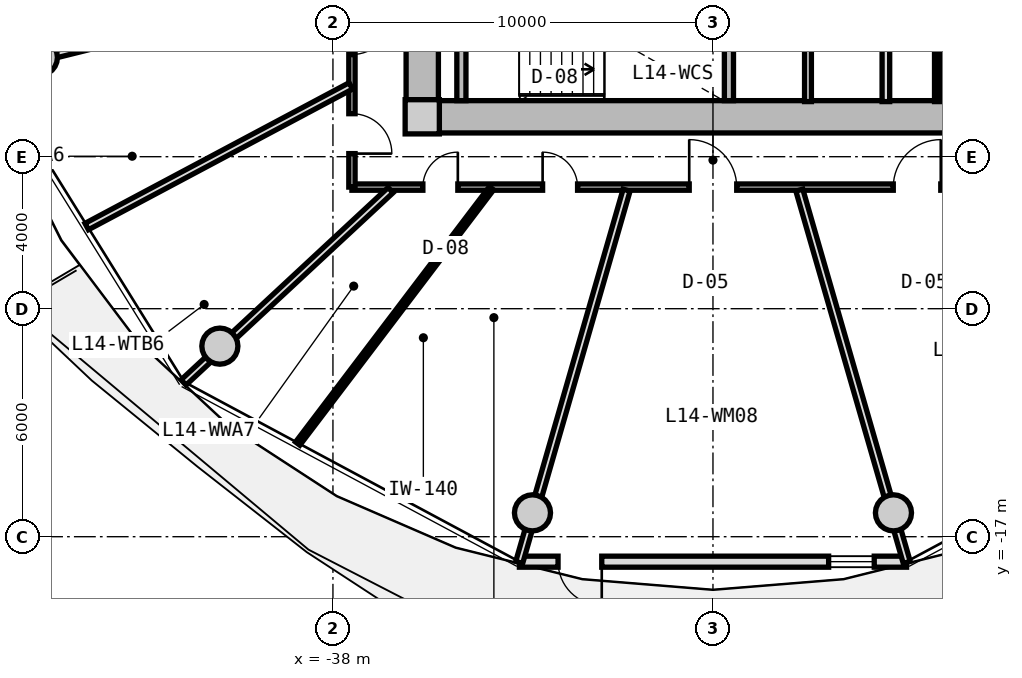
"""IFC4 building model, lengths in metres.
Left out: names, types, materials, properties, quantities, classifications, styles, units other than length and angle.
Written with IfcOpenShell. Run it as: python <this file> out.ifc"""

import sys

from ifc_helpers import new_model, si_unit, direction, frame, frame_2d, origin, origin_2d, place, context, subcontext, project, spatial, rectangle, circle, extrude, source, transform, mapped, element, fill, save


model = new_model("IFC4")
c1 = context("Model", 3, precision=1e-05, world=origin(), true_north=direction((0.0, 1.0)))
c2 = subcontext(c1, "Body", "Model", "MODEL_VIEW")
j1 = project(units=[si_unit("LENGTHUNIT", "METRE"), si_unit("PLANEANGLEUNIT", "RADIAN")], contexts=[c1])
p1 = place(None, origin())
s1 = spatial("IfcSite", under=j1, at=p1, CompositionType="ELEMENT")
p2 = place(p1, origin())
s2 = spatial("IfcBuilding", under=s1, at=p2, CompositionType="ELEMENT")
p3 = place(p2, frame((0.0, 0.0, 49.05)))
s3 = spatial("IfcBuildingStorey", under=s2, at=p3, CompositionType="ELEMENT", Elevation=49.05)
m1 = source(origin(), c2, "Body", "SweptSolid", [
    extrude(rectangle(XDim=0.9, YDim=0.9, at=origin_2d()), origin(), (0.0, 0.0, 1.0), 3.05),
])
p4 = place(p3, frame((-35.65, -5.95, 0.0), z_axis=(0.0, 0.0, 1.0), x_axis=(1.0, 0.0, 0.0)))
e1 = element("IfcColumn", 1, at=p4, inside=s3, PredefinedType="COLUMN", context=c2, shape_type="MappedRepresentation", body=[
    mapped(m1, transform((0.0, 0.0, 0.0), x_axis=(1.0, 0.0, 0.0), y_axis=(0.0, 1.0, 0.0), z_axis=(0.0, 0.0, 1.0), scale=1.0)),
])
m2 = source(origin(), c2, "Body", "SweptSolid", [
    extrude(rectangle(XDim=14.4, YDim=0.85, at=frame_2d((7.2, 0.0))), origin(), (0.0, 0.0, 1.0), 2.79),
])
p5 = place(p3, frame((-20.8, -5.95, 0.0), z_axis=(0.0, 0.0, 1.0), x_axis=(-1.0, 0.0, 0.0)))
e2 = element("IfcWall", 2, at=p5, inside=s3, PredefinedType="SHEAR", context=c2, shape_type="MappedRepresentation", body=[
    mapped(m2, transform((0.0, 0.0, 0.0), x_axis=(1.0, 0.0, 0.0), y_axis=(0.0, 1.0, 0.0), z_axis=(0.0, 0.0, 1.0), scale=1.0)),
])
m3 = source(origin(), c2, "Body", "SweptSolid", [
    extrude(rectangle(XDim=11.0, YDim=0.85, at=frame_2d((5.5, 0.0))), origin(), (0.0, 0.0, 1.0), 2.79),
])
p6 = place(p3, frame((-35.65, -5.5, 0.0), z_axis=(0.0, 0.0, 1.0), x_axis=(0.0, 1.0, 0.0)))
e3 = element("IfcWall", 3, at=p6, inside=s3, PredefinedType="SHEAR", context=c2, shape_type="MappedRepresentation", body=[
    mapped(m3, transform((0.0, 0.0, 0.0), x_axis=(1.0, 0.0, 0.0), y_axis=(0.0, 1.0, 0.0), z_axis=(0.0, 0.0, 1.0), scale=1.0)),
])
p7 = place(p6, frame((3.8, 0.0, 0.0)))
e4 = element("IfcOpeningElement", 4, at=p7, cuts=e3, PredefinedType="OPENING", context=c2, shape_type="SweptSolid", body=[
    extrude(rectangle(XDim=1.2, YDim=2.15, at=frame_2d((0.6, 1.075))), frame((0.0, 0.435, 0.0), z_axis=(0.0, -1.0, 0.0), x_axis=(1.0, 0.0, 0.0)), (0.0, 0.0, 1.0), 0.87),
])
m4 = source(origin(), c2, "Body", "SweptSolid", [
    extrude(circle(Radius=0.475, at=origin_2d()), origin(), (0.0, 0.0, 1.0), 3.05),
])
for number, where, z_axis, x_axis in (
    (5, (-45.725, -4.387, 0.0), (0.0, 0.0, 1.0), (1.0, 0.0, 0.0)),
    (6, (-40.975, -11.985, 0.0), (0.0, 0.0, 1.0), (1.0, 0.0, 0.0)),
    (7, (-32.749, -16.373, 0.0), (0.0, 0.0, 1.0), (1.0, 0.0, 0.0)),
    (8, (-23.251, -16.373, 0.0), (0.0, 0.0, 1.0), (1.0, 0.0, 0.0)),
):
    element("IfcColumn", number, at=place(p3, frame(where, z_axis=z_axis, x_axis=x_axis)), inside=s3, PredefinedType="COLUMN", context=c2, shape_type="MappedRepresentation", body=[
        mapped(m4, transform((0.0, 0.0, 0.0), x_axis=(1.0, 0.0, 0.0), y_axis=(0.0, 1.0, 0.0), z_axis=(0.0, 0.0, 1.0), scale=1.0)),
    ])
m5 = source(origin(), c2, "Body", "SweptSolid", [
    extrude(rectangle(XDim=10.187, YDim=0.29, at=frame_2d((5.094, 0.0))), origin(), (0.0, 0.0, 1.0), 2.79),
])
p8 = place(p3, frame((-22.906, -17.657, 0.0), z_axis=(0.0, 0.0, 1.0), x_axis=(-1.0, 0.0, 0.0)))
e9 = element("IfcWall", 9, at=p8, inside=s3, PredefinedType="SOLIDWALL", context=c2, shape_type="MappedRepresentation", body=[
    mapped(m5, transform((0.0, 0.0, 0.0), x_axis=(1.0, 0.0, 0.0), y_axis=(0.0, 1.0, 0.0), z_axis=(0.0, 0.0, 1.0), scale=1.0)),
])
p9 = place(p8, frame((8.02, 0.0, 0.0)))
e10 = element("IfcOpeningElement", 10, at=p9, cuts=e9, PredefinedType="OPENING", context=c2, shape_type="SweptSolid", body=[
    extrude(rectangle(XDim=1.15, YDim=2.25, at=frame_2d((0.575, 1.125))), frame((0.0, 0.155, 0.0), z_axis=(0.0, -1.0, 0.0), x_axis=(1.0, 0.0, 0.0)), (0.0, 0.0, 1.0), 0.31),
])
p10 = place(p8, frame((0.85, 0.0, 0.85)))
e11 = element("IfcOpeningElement", 11, at=p10, cuts=e9, PredefinedType="OPENING", context=c2, shape_type="SweptSolid", body=[
    extrude(rectangle(XDim=1.2, YDim=1.5, at=frame_2d((0.6, 0.75))), frame((0.0, 0.155, 0.0), z_axis=(0.0, -1.0, 0.0), x_axis=(1.0, 0.0, 0.0)), (0.0, 0.0, 1.0), 0.31),
])
m6 = source(origin(), c2, "Body", "SweptSolid", [
    extrude(rectangle(XDim=3.075, YDim=0.24, at=frame_2d((1.538, 0.0))), origin(), (0.0, 0.0, 1.0), 2.79),
])
for number, where, z_axis, x_axis in (
    (12, (-34.62, -5.525, 0.0), (0.0, 0.0, 1.0), (0.0, 1.0, 0.0)),
    (13, (-27.58, -5.525, 0.0), (0.0, 0.0, 1.0), (0.0, 1.0, 0.0)),
):
    element("IfcWall", number, at=place(p3, frame(where, z_axis=z_axis, x_axis=x_axis)), inside=s3, PredefinedType="PARTITIONING", context=c2, shape_type="MappedRepresentation", body=[
        mapped(m6, transform((0.0, 0.0, 0.0), x_axis=(1.0, 0.0, 0.0), y_axis=(0.0, 1.0, 0.0), z_axis=(0.0, 0.0, 1.0), scale=1.0)),
    ])
m7 = source(origin(), c2, "Body", "SweptSolid", [
    extrude(rectangle(XDim=3.8, YDim=0.2, at=frame_2d((1.9, 0.0))), origin(), (0.0, 0.0, 1.0), 2.775),
])
p11 = place(p3, frame((-23.45, -5.55, 0.0), z_axis=(0.0, 0.0, 1.0), x_axis=(0.0, 1.0, 0.0)))
e14 = element("IfcWall", 14, at=p11, inside=s3, PredefinedType="PARTITIONING", context=c2, shape_type="MappedRepresentation", body=[
    mapped(m7, transform((0.0, 0.0, 0.0), x_axis=(1.0, 0.0, 0.0), y_axis=(0.0, 1.0, 0.0), z_axis=(0.0, 0.0, 1.0), scale=1.0)),
])
m8 = source(origin(), c2, "Body", "SweptSolid", [
    extrude(rectangle(XDim=3.22, YDim=0.18, at=frame_2d((1.61, 0.0))), origin(), (0.0, 0.0, 1.0), 2.775),
])
p12 = place(p3, frame((-25.5, -5.55, 0.0), z_axis=(0.0, 0.0, 1.0), x_axis=(0.0, 1.0, 0.0)))
e15 = element("IfcWall", 15, at=p12, inside=s3, PredefinedType="PARTITIONING", context=c2, shape_type="MappedRepresentation", body=[
    mapped(m8, transform((0.0, 0.0, 0.0), x_axis=(1.0, 0.0, 0.0), y_axis=(0.0, 1.0, 0.0), z_axis=(0.0, 0.0, 1.0), scale=1.0)),
])
m9 = source(origin(), c2, "Body", "SweptSolid", [
    extrude(rectangle(XDim=3.8, YDim=0.14, at=frame_2d((1.9, 0.0))), origin(), (0.0, 0.0, 1.0), 2.775),
])
p13 = place(p3, frame((-22.1, -5.55, 0.0), z_axis=(0.0, 0.0, 1.0), x_axis=(0.0, 1.0, 0.0)))
e16 = element("IfcWall", 16, at=p13, inside=s3, PredefinedType="PARTITIONING", context=c2, shape_type="MappedRepresentation", body=[
    mapped(m9, transform((0.0, 0.0, 0.0), x_axis=(1.0, 0.0, 0.0), y_axis=(0.0, 1.0, 0.0), z_axis=(0.0, 0.0, 1.0), scale=1.0)),
])
m10 = source(origin(), c2, "Body", "SweptSolid", [
    extrude(rectangle(XDim=19.0, YDim=0.165, at=frame_2d((9.5, 0.0))), origin(), (0.0, 0.0, 1.0), 2.775),
])
p14 = place(p3, frame((-18.5, -7.8, 0.0), z_axis=(0.0, 0.0, 1.0), x_axis=(-1.0, 0.0, 0.0)))
e17 = element("IfcWall", 17, at=p14, inside=s3, PredefinedType="PARTITIONING", context=c2, shape_type="MappedRepresentation", body=[
    mapped(m10, transform((0.0, 0.0, 0.0), x_axis=(1.0, 0.0, 0.0), y_axis=(0.0, 1.0, 0.0), z_axis=(0.0, 0.0, 1.0), scale=1.0)),
])
p15 = place(p14, frame((16.214, 0.0, 0.0)))
e18 = element("IfcOpeningElement", 18, at=p15, cuts=e17, PredefinedType="OPENING", context=c2, shape_type="SweptSolid", body=[
    extrude(rectangle(XDim=0.92, YDim=2.1, at=frame_2d((0.46, 1.05))), frame((0.0, 0.093, 0.0), z_axis=(0.0, -1.0, 0.0), x_axis=(1.0, 0.0, 0.0)), (0.0, 0.0, 1.0), 0.185),
])
p16 = place(p14, frame((13.063, 0.0, 0.0)))
e19 = element("IfcOpeningElement", 19, at=p16, cuts=e17, PredefinedType="OPENING", context=c2, shape_type="SweptSolid", body=[
    extrude(rectangle(XDim=0.92, YDim=2.1, at=frame_2d((0.46, 1.05))), frame((0.0, 0.093, 0.0), z_axis=(0.0, -1.0, 0.0), x_axis=(1.0, 0.0, 0.0)), (0.0, 0.0, 1.0), 0.185),
])
p17 = place(p14, frame((8.875, 0.0, 0.0)))
e20 = element("IfcOpeningElement", 20, at=p17, cuts=e17, PredefinedType="OPENING", context=c2, shape_type="SweptSolid", body=[
    extrude(rectangle(XDim=1.25, YDim=2.2, at=frame_2d((0.625, 1.1))), frame((0.0, 0.093, 0.0), z_axis=(0.0, -1.0, 0.0), x_axis=(1.0, 0.0, 0.0)), (0.0, 0.0, 1.0), 0.185),
])
p18 = place(p14, frame((3.506, 0.0, 0.0)))
e21 = element("IfcOpeningElement", 21, at=p18, cuts=e17, PredefinedType="OPENING", context=c2, shape_type="SweptSolid", body=[
    extrude(rectangle(XDim=1.25, YDim=2.2, at=frame_2d((0.625, 1.1))), frame((0.0, 0.093, 0.0), z_axis=(0.0, -1.0, 0.0), x_axis=(1.0, 0.0, 0.0)), (0.0, 0.0, 1.0), 0.185),
])
m11 = source(origin(), c2, "Body", "SweptSolid", [
    extrude(rectangle(XDim=15.6, YDim=0.165, at=frame_2d((7.8, 0.0))), origin(), (0.0, 0.0, 1.0), 2.775),
])
p19 = place(p3, frame((-37.5, -7.8, 0.0), z_axis=(0.0, 0.0, 1.0), x_axis=(0.0, 1.0, 0.0)))
e22 = element("IfcWall", 22, at=p19, inside=s3, PredefinedType="PARTITIONING", context=c2, shape_type="MappedRepresentation", body=[
    mapped(m11, transform((0.0, 0.0, 0.0), x_axis=(1.0, 0.0, 0.0), y_axis=(0.0, 1.0, 0.0), z_axis=(0.0, 0.0, 1.0), scale=1.0)),
])
p20 = place(p19, frame((13.623, 0.0, 0.0)))
e23 = element("IfcOpeningElement", 23, at=p20, cuts=e22, PredefinedType="OPENING", context=c2, shape_type="SweptSolid", body=[
    extrude(rectangle(XDim=1.05, YDim=2.15, at=frame_2d((0.525, 1.075))), frame((0.0, 0.093, 0.0), z_axis=(0.0, -1.0, 0.0), x_axis=(1.0, 0.0, 0.0)), (0.0, 0.0, 1.0), 0.185),
])
p21 = place(p19, frame((11.018, 0.0, 0.0)))
e24 = element("IfcOpeningElement", 24, at=p21, cuts=e22, PredefinedType="OPENING", context=c2, shape_type="SweptSolid", body=[
    extrude(rectangle(XDim=1.05, YDim=2.15, at=frame_2d((0.525, 1.075))), frame((0.0, 0.093, 0.0), z_axis=(0.0, -1.0, 0.0), x_axis=(1.0, 0.0, 0.0)), (0.0, 0.0, 1.0), 0.185),
])
p22 = place(p19, frame((8.467, 0.0, 0.0)))
e25 = element("IfcOpeningElement", 25, at=p22, cuts=e22, PredefinedType="OPENING", context=c2, shape_type="SweptSolid", body=[
    extrude(rectangle(XDim=1.05, YDim=2.15, at=frame_2d((0.525, 1.075))), frame((0.0, 0.093, 0.0), z_axis=(0.0, -1.0, 0.0), x_axis=(1.0, 0.0, 0.0)), (0.0, 0.0, 1.0), 0.185),
])
p23 = place(p19, frame((6.035, 0.0, 0.0)))
e26 = element("IfcOpeningElement", 26, at=p23, cuts=e22, PredefinedType="OPENING", context=c2, shape_type="SweptSolid", body=[
    extrude(rectangle(XDim=1.05, YDim=2.15, at=frame_2d((0.525, 1.075))), frame((0.0, 0.093, 0.0), z_axis=(0.0, -1.0, 0.0), x_axis=(1.0, 0.0, 0.0)), (0.0, 0.0, 1.0), 0.185),
])
p24 = place(p19, frame((3.489, 0.0, 0.0)))
e27 = element("IfcOpeningElement", 27, at=p24, cuts=e22, PredefinedType="OPENING", context=c2, shape_type="SweptSolid", body=[
    extrude(rectangle(XDim=1.05, YDim=2.15, at=frame_2d((0.525, 1.075))), frame((0.0, 0.093, 0.0), z_axis=(0.0, -1.0, 0.0), x_axis=(1.0, 0.0, 0.0)), (0.0, 0.0, 1.0), 0.185),
])
p25 = place(p19, frame((0.882, 0.0, 0.0)))
e28 = element("IfcOpeningElement", 28, at=p25, cuts=e22, PredefinedType="OPENING", context=c2, shape_type="SweptSolid", body=[
    extrude(rectangle(XDim=1.05, YDim=2.15, at=frame_2d((0.525, 1.075))), frame((0.0, 0.093, 0.0), z_axis=(0.0, -1.0, 0.0), x_axis=(1.0, 0.0, 0.0)), (0.0, 0.0, 1.0), 0.185),
])
m12 = source(origin(), c2, "Body", "SweptSolid", [
    extrude(rectangle(XDim=9.737, YDim=0.19, at=frame_2d((4.869, 0.0))), origin(), (0.0, 0.0, 1.0), 2.225),
])
p26 = place(p3, frame((-37.58, -2.385, 0.0), z_axis=(0.0, 0.0, 1.0), x_axis=(-0.970392716238, -0.241532557375, 0.0)))
e29 = element("IfcWall", 29, at=p26, inside=s3, PredefinedType="PARTITIONING", context=c2, shape_type="MappedRepresentation", body=[
    mapped(m12, transform((0.0, 0.0, 0.0), x_axis=(1.0, 0.0, 0.0), y_axis=(0.0, 1.0, 0.0), z_axis=(0.0, 0.0, 1.0), scale=1.0)),
])
m13 = source(origin(), c2, "Body", "SweptSolid", [
    extrude(rectangle(XDim=7.435, YDim=0.19, at=frame_2d((3.717, 0.0))), origin(), (0.0, 0.0, 1.0), 2.225),
])
p27 = place(p3, frame((-36.483, -7.88, 0.0), z_axis=(0.0, 0.0, 1.0), x_axis=(-0.732651956848, -0.680603489652, 0.0)))
e30 = element("IfcWall", 30, at=p27, inside=s3, PredefinedType="PARTITIONING", context=c2, shape_type="MappedRepresentation", body=[
    mapped(m13, transform((0.0, 0.0, 0.0), x_axis=(1.0, 0.0, 0.0), y_axis=(0.0, 1.0, 0.0), z_axis=(0.0, 0.0, 1.0), scale=1.0)),
])
m14 = source(origin(), c2, "Body", "SweptSolid", [
    extrude(rectangle(XDim=7.873, YDim=0.19, at=frame_2d((3.937, 0.0))), origin(), (0.0, 0.0, 1.0), 2.775),
])
p28 = place(p3, frame((-37.53, -5.138, 0.0), z_axis=(0.0, 0.0, 1.0), x_axis=(-0.882666052726, -0.470000680175, 0.0)))
e31 = element("IfcWall", 31, at=p28, inside=s3, PredefinedType="PARTITIONING", context=c2, shape_type="MappedRepresentation", body=[
    mapped(m14, transform((0.0, 0.0, 0.0), x_axis=(1.0, 0.0, 0.0), y_axis=(0.0, 1.0, 0.0), z_axis=(0.0, 0.0, 1.0), scale=1.0)),
])
m15 = source(origin(), c2, "Body", "SweptSolid", [
    extrude(rectangle(XDim=10.196, YDim=0.19, at=frame_2d((5.098, 0.0))), origin(), (0.0, 0.0, 1.0), 2.225),
])
p29 = place(p3, frame((-30.273, -7.88, 0.0), z_axis=(0.0, 0.0, 1.0), x_axis=(-0.277136420347, -0.960830580549, 0.0)))
e32 = element("IfcWall", 32, at=p29, inside=s3, PredefinedType="PARTITIONING", context=c2, shape_type="MappedRepresentation", body=[
    mapped(m15, transform((0.0, 0.0, 0.0), x_axis=(1.0, 0.0, 0.0), y_axis=(0.0, 1.0, 0.0), z_axis=(0.0, 0.0, 1.0), scale=1.0)),
])
m16 = source(origin(), c2, "Body", "SweptSolid", [
    extrude(rectangle(XDim=8.436, YDim=0.14, at=frame_2d((4.218, 0.0))), origin(), (0.0, 0.0, 1.0), 2.775),
])
p30 = place(p3, frame((-33.828, -7.83, 0.0), z_axis=(0.0, 0.0, 1.0), x_axis=(-0.604486552388, -0.796615345058, 0.0)))
e33 = element("IfcWall", 33, at=p30, inside=s3, PredefinedType="PARTITIONING", context=c2, shape_type="MappedRepresentation", body=[
    mapped(m16, transform((0.0, 0.0, 0.0), x_axis=(1.0, 0.0, 0.0), y_axis=(0.0, 1.0, 0.0), z_axis=(0.0, 0.0, 1.0), scale=1.0)),
])
p31 = place(p3, frame((-25.727, -7.88, 0.0), z_axis=(0.0, 0.0, 1.0), x_axis=(0.277136420347, -0.960830580549, 0.0)))
e34 = element("IfcWall", 34, at=p31, inside=s3, PredefinedType="PARTITIONING", context=c2, shape_type="MappedRepresentation", body=[
    mapped(m15, transform((0.0, 0.0, 0.0), x_axis=(1.0, 0.0, 0.0), y_axis=(0.0, 1.0, 0.0), z_axis=(0.0, 0.0, 1.0), scale=1.0)),
])
m17 = source(origin(), c2, "Body", "SweptSolid", [
    extrude(rectangle(XDim=1.15, YDim=2.25, at=frame_2d((0.575, 1.125))), frame((0.0, 0.025, 0.0), z_axis=(0.0, -1.0, 0.0), x_axis=(1.0, 0.0, 0.0)), (0.0, 0.0, 1.0), 0.05),
])
p32 = place(p9, origin())
e35 = element("IfcDoor", 35, at=p32, inside=s3, OperationType="SINGLE_SWING_LEFT", PredefinedType="DOOR", context=c2, shape_type="MappedRepresentation", body=[
    mapped(m17, transform((0.0, 0.0, 0.0), x_axis=(1.0, 0.0, 0.0), y_axis=(0.0, 1.0, 0.0), z_axis=(0.0, 0.0, 1.0), scale=1.0)),
])
fill(e10, e35)
m18 = source(origin(), c2, "Body", "SweptSolid", [
    extrude(rectangle(XDim=1.2, YDim=1.5, at=frame_2d((0.6, 0.75))), frame((0.0, 0.03, 0.0), z_axis=(0.0, -1.0, 0.0), x_axis=(1.0, 0.0, 0.0)), (0.0, 0.0, 1.0), 0.06),
])
p33 = place(p10, origin())
e36 = element("IfcWindow", 36, at=p33, inside=s3, PartitioningType="SINGLE_PANEL", PredefinedType="WINDOW", context=c2, shape_type="MappedRepresentation", body=[
    mapped(m18, transform((0.0, 0.0, 0.0), x_axis=(1.0, 0.0, 0.0), y_axis=(0.0, 1.0, 0.0), z_axis=(0.0, 0.0, 1.0), scale=1.0)),
])
fill(e11, e36)
m19 = source(origin(), c2, "Body", "SweptSolid", [
    extrude(rectangle(XDim=1.05, YDim=2.15, at=frame_2d((0.525, 1.075))), frame((0.0, 0.025, 0.0), z_axis=(0.0, -1.0, 0.0), x_axis=(1.0, 0.0, 0.0)), (0.0, 0.0, 1.0), 0.05),
])
p34 = place(p24, frame((1.05, 0.0, 0.0), z_axis=(0.0, 0.0, 1.0), x_axis=(-1.0, 0.0, 0.0)))
e37 = element("IfcDoor", 37, at=p34, inside=s3, OperationType="SINGLE_SWING_LEFT", PredefinedType="DOOR", context=c2, shape_type="MappedRepresentation", body=[
    mapped(m19, transform((0.0, 0.0, 0.0), x_axis=(1.0, 0.0, 0.0), y_axis=(0.0, 1.0, 0.0), z_axis=(0.0, 0.0, 1.0), scale=1.0)),
])
fill(e27, e37)
p35 = place(p25, frame((1.05, 0.0, 0.0), z_axis=(0.0, 0.0, 1.0), x_axis=(-1.0, 0.0, 0.0)))
e38 = element("IfcDoor", 38, at=p35, inside=s3, OperationType="SINGLE_SWING_RIGHT", PredefinedType="DOOR", context=c2, shape_type="MappedRepresentation", body=[
    mapped(m19, transform((0.0, 0.0, 0.0), x_axis=(1.0, 0.0, 0.0), y_axis=(0.0, 1.0, 0.0), z_axis=(0.0, 0.0, 1.0), scale=1.0)),
])
fill(e28, e38)
m20 = source(origin(), c2, "Body", "SweptSolid", [
    extrude(rectangle(XDim=0.92, YDim=2.1, at=frame_2d((0.46, 1.05))), frame((0.0, 0.025, 0.0), z_axis=(0.0, -1.0, 0.0), x_axis=(1.0, 0.0, 0.0)), (0.0, 0.0, 1.0), 0.05),
])
p36 = place(p15, frame((0.92, 0.0, 0.0), z_axis=(0.0, 0.0, 1.0), x_axis=(-1.0, 0.0, 0.0)))
e39 = element("IfcDoor", 39, at=p36, inside=s3, OperationType="SINGLE_SWING_RIGHT", PredefinedType="DOOR", context=c2, shape_type="MappedRepresentation", body=[
    mapped(m20, transform((0.0, 0.0, 0.0), x_axis=(1.0, 0.0, 0.0), y_axis=(0.0, 1.0, 0.0), z_axis=(0.0, 0.0, 1.0), scale=1.0)),
])
fill(e18, e39)
p37 = place(p16, frame((0.92, 0.0, 0.0), z_axis=(0.0, 0.0, 1.0), x_axis=(-1.0, 0.0, 0.0)))
e40 = element("IfcDoor", 40, at=p37, inside=s3, OperationType="SINGLE_SWING_LEFT", PredefinedType="DOOR", context=c2, shape_type="MappedRepresentation", body=[
    mapped(m20, transform((0.0, 0.0, 0.0), x_axis=(1.0, 0.0, 0.0), y_axis=(0.0, 1.0, 0.0), z_axis=(0.0, 0.0, 1.0), scale=1.0)),
])
fill(e19, e40)
m21 = source(origin(), c2, "Body", "SweptSolid", [
    extrude(rectangle(XDim=1.25, YDim=2.2, at=frame_2d((0.625, 1.1))), frame((0.0, 0.025, 0.0), z_axis=(0.0, -1.0, 0.0), x_axis=(1.0, 0.0, 0.0)), (0.0, 0.0, 1.0), 0.05),
])
p38 = place(p17, frame((1.25, 0.0, 0.0), z_axis=(0.0, 0.0, 1.0), x_axis=(-1.0, 0.0, 0.0)))
e41 = element("IfcDoor", 41, at=p38, inside=s3, OperationType="SINGLE_SWING_LEFT", PredefinedType="DOOR", context=c2, shape_type="MappedRepresentation", body=[
    mapped(m21, transform((0.0, 0.0, 0.0), x_axis=(1.0, 0.0, 0.0), y_axis=(0.0, 1.0, 0.0), z_axis=(0.0, 0.0, 1.0), scale=1.0)),
])
fill(e20, e41)
p39 = place(p18, frame((1.25, 0.0, 0.0), z_axis=(0.0, 0.0, 1.0), x_axis=(-1.0, 0.0, 0.0)))
e42 = element("IfcDoor", 42, at=p39, inside=s3, OperationType="SINGLE_SWING_RIGHT", PredefinedType="DOOR", context=c2, shape_type="MappedRepresentation", body=[
    mapped(m21, transform((0.0, 0.0, 0.0), x_axis=(1.0, 0.0, 0.0), y_axis=(0.0, 1.0, 0.0), z_axis=(0.0, 0.0, 1.0), scale=1.0)),
])
fill(e21, e42)
save(model, sys.argv[1])
